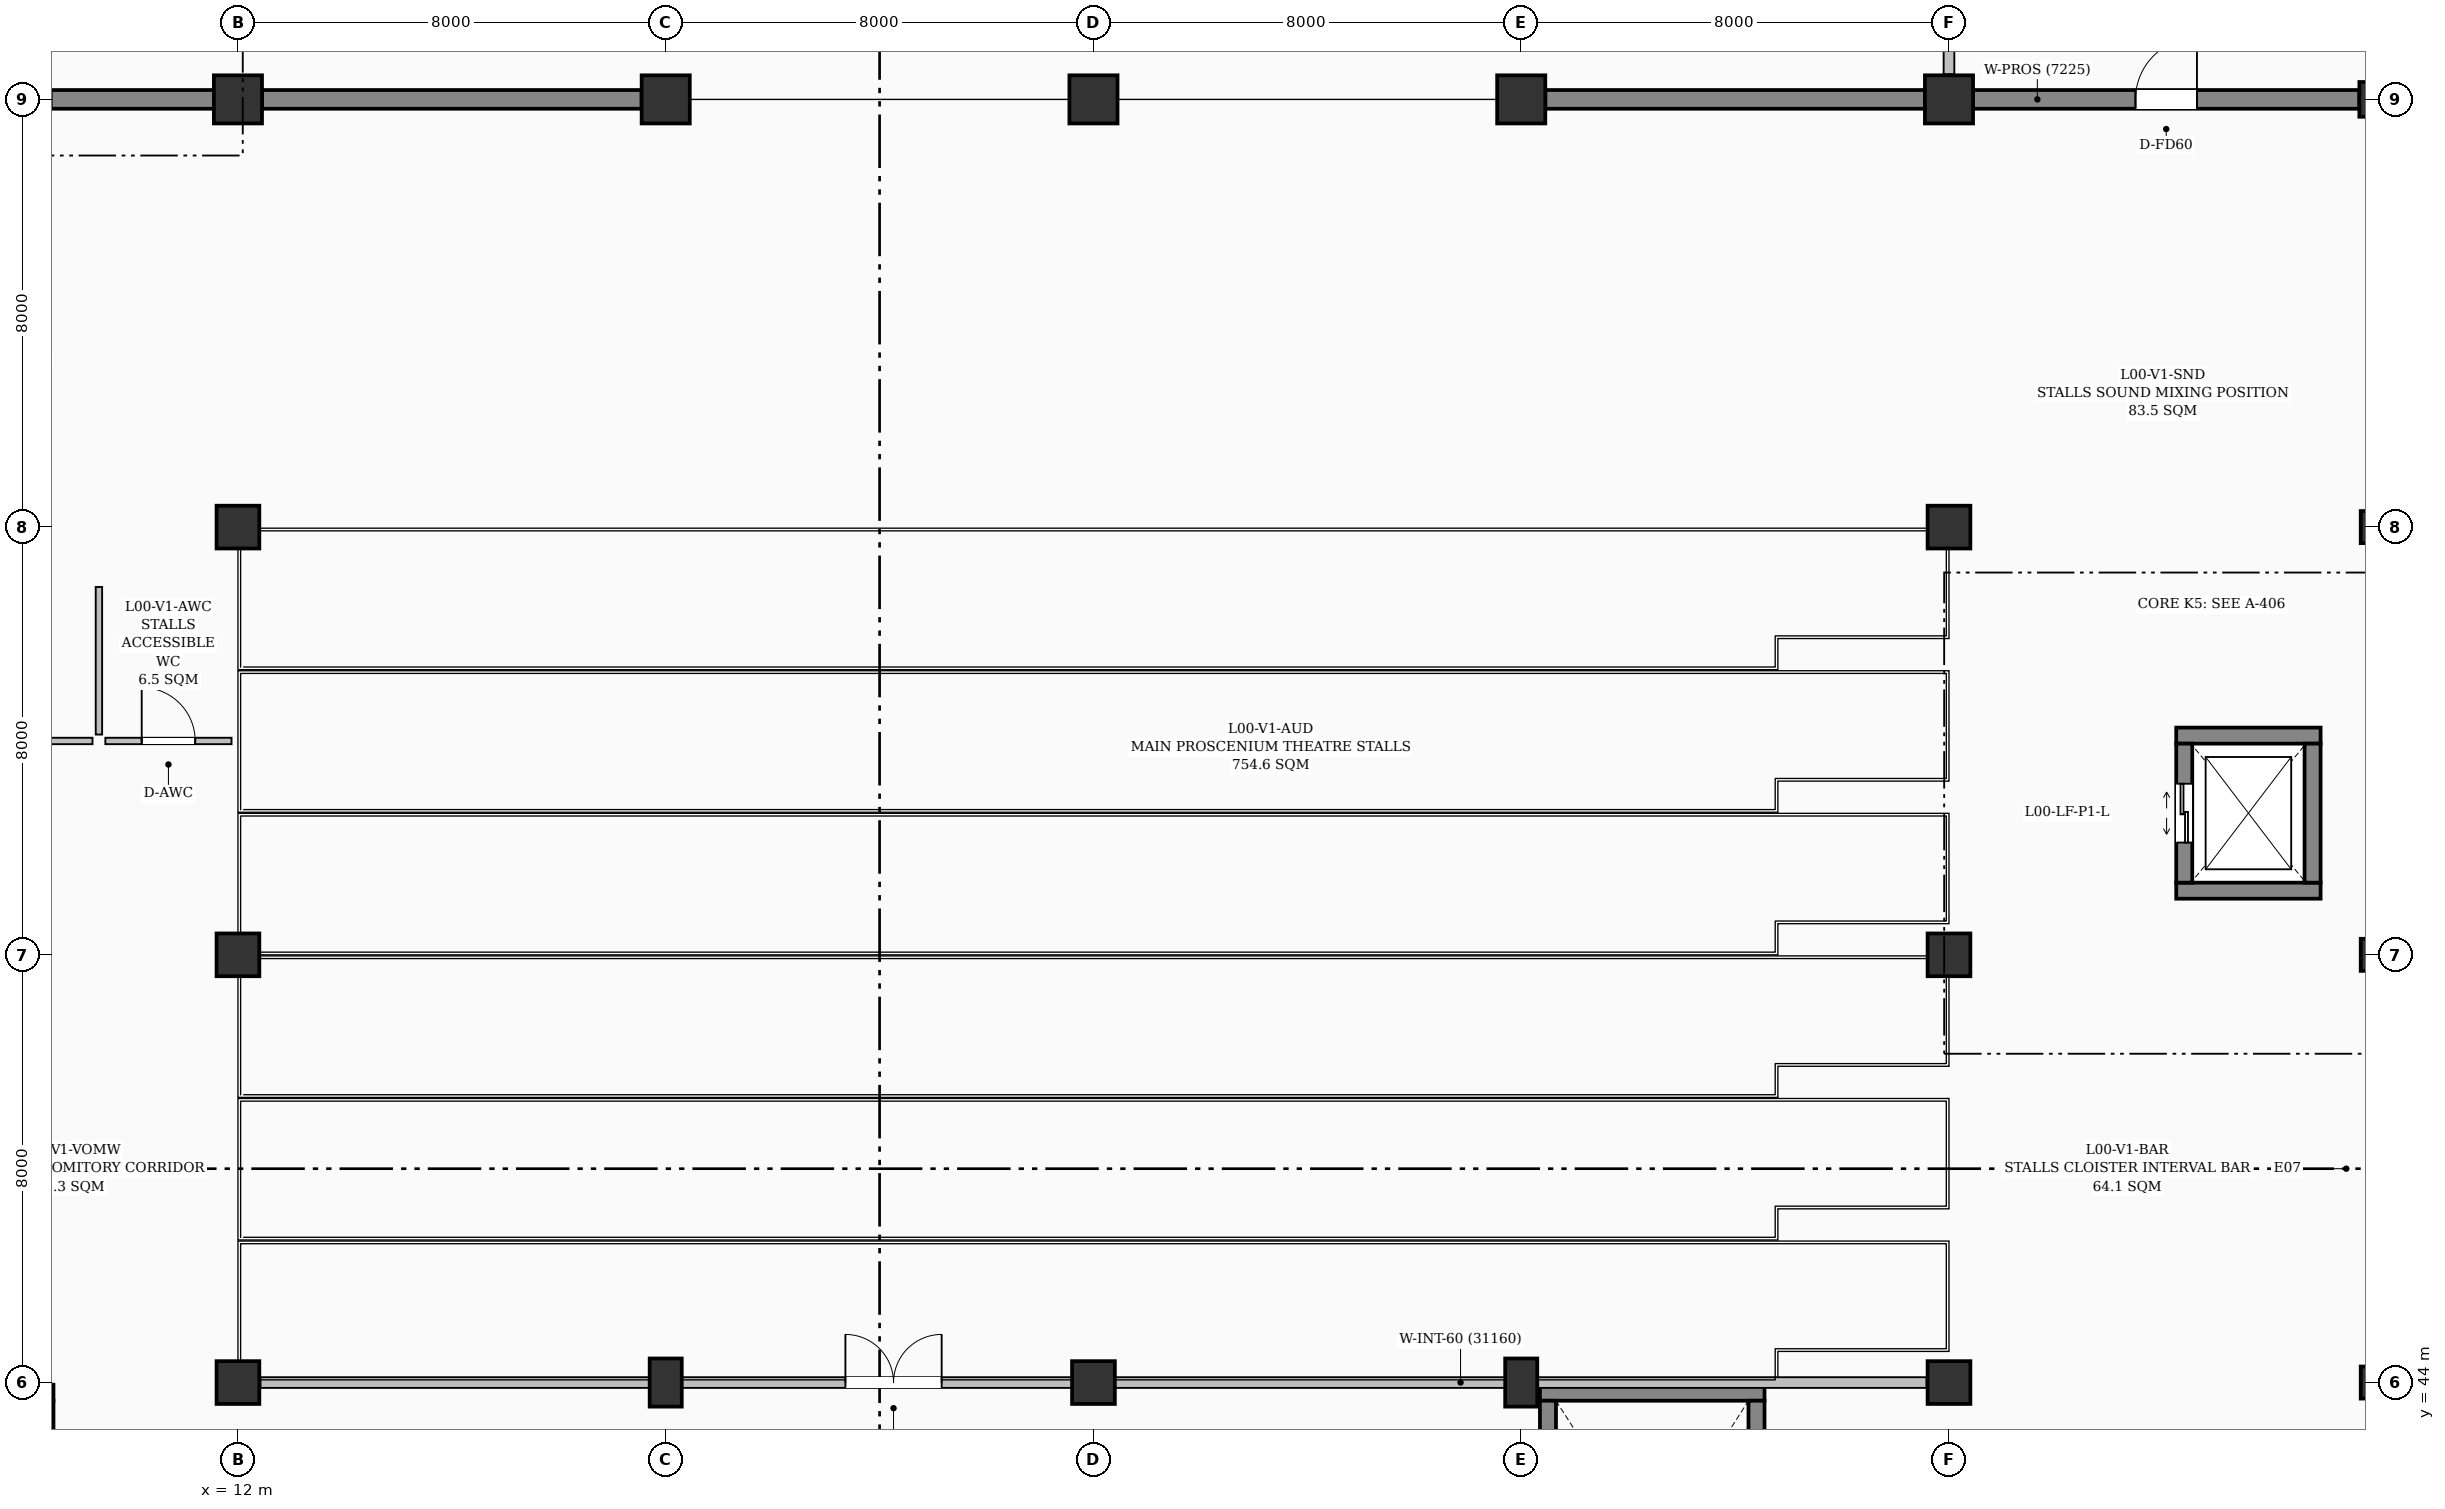
"""IFC4 building model, lengths in metres.
Left out: names, types, materials, properties, quantities, classifications, styles, units other than length and angle.
Written with IfcOpenShell. Run it as: python <this file> out.ifc"""

import sys

from ifc_helpers import new_model, si_unit, direction, frame, frame_2d, origin, origin_2d, place, context, subcontext, project, spatial, rectangle, extrude, element, fill, save


model = new_model("IFC4")
c1 = context("Model", 3, precision=1e-05, world=origin(), true_north=direction((0.0, 1.0)))
c2 = subcontext(c1, "Body", "Model", "MODEL_VIEW")
j1 = project(units=[si_unit("LENGTHUNIT", "METRE"), si_unit("PLANEANGLEUNIT", "RADIAN")], contexts=[c1])
p1 = place(None, origin())
s1 = spatial("IfcSite", under=j1, at=p1, CompositionType="ELEMENT")
p2 = place(p1, origin())
s2 = spatial("IfcBuilding", under=s1, at=p2, CompositionType="ELEMENT")
p3 = place(p2, origin())
s3 = spatial("IfcBuildingStorey", under=s2, at=p3, CompositionType="ELEMENT", Elevation=0.0)
for number, where, z_axis, x_axis in (
    (1, (12.0, 44.0, 0.0), (0.0, 0.0, 1.0), (1.0, 0.0, 0.0)),
    (2, (12.0, 52.0, 0.0), (0.0, 0.0, 1.0), (1.0, 0.0, 0.0)),
    (3, (12.0, 60.0, 0.0), (0.0, 0.0, 1.0), (1.0, 0.0, 0.0)),
):
    element("IfcColumn", number, at=place(p3, frame(where, z_axis=z_axis, x_axis=x_axis)), inside=s3, PredefinedType="COLUMN", context=c2, shape_type="SweptSolid", body=[
        extrude(rectangle(XDim=0.8, YDim=0.8, at=origin_2d()), origin(), (0.0, 0.0, 1.0), 4.8),
    ])
p4 = place(p3, frame((12.0, 68.0, 0.0), z_axis=(0.0, 0.0, 1.0), x_axis=(1.0, 0.0, 0.0)))
e4 = element("IfcColumn", 4, at=p4, inside=s3, PredefinedType="COLUMN", context=c2, shape_type="SweptSolid", body=[
    extrude(rectangle(XDim=0.9, YDim=0.9, at=origin_2d()), origin(), (0.0, 0.0, 1.0), 4.8),
])
p5 = place(p3, frame((20.0, 44.0, 0.0), z_axis=(0.0, 0.0, 1.0), x_axis=(1.0, 0.0, 0.0)))
e5 = element("IfcColumn", 5, at=p5, inside=s3, PredefinedType="COLUMN", context=c2, shape_type="SweptSolid", body=[
    extrude(rectangle(XDim=0.6, YDim=0.9, at=origin_2d()), origin(), (0.0, 0.0, 1.0), 4.8),
])
p6 = place(p3, frame((20.0, 68.0, 0.0), z_axis=(0.0, 0.0, 1.0), x_axis=(1.0, 0.0, 0.0)))
e6 = element("IfcColumn", 6, at=p6, inside=s3, PredefinedType="COLUMN", context=c2, shape_type="SweptSolid", body=[
    extrude(rectangle(XDim=0.9, YDim=0.9, at=origin_2d()), origin(), (0.0, 0.0, 1.0), 4.8),
])
p7 = place(p3, frame((28.0, 44.0, 0.0), z_axis=(0.0, 0.0, 1.0), x_axis=(1.0, 0.0, 0.0)))
e7 = element("IfcColumn", 7, at=p7, inside=s3, PredefinedType="COLUMN", context=c2, shape_type="SweptSolid", body=[
    extrude(rectangle(XDim=0.8, YDim=0.8, at=origin_2d()), origin(), (0.0, 0.0, 1.0), 4.8),
])
p8 = place(p3, frame((28.0, 68.0, 0.0), z_axis=(0.0, 0.0, 1.0), x_axis=(1.0, 0.0, 0.0)))
e8 = element("IfcColumn", 8, at=p8, inside=s3, PredefinedType="COLUMN", context=c2, shape_type="SweptSolid", body=[
    extrude(rectangle(XDim=0.9, YDim=0.9, at=origin_2d()), origin(), (0.0, 0.0, 1.0), 4.8),
])
p9 = place(p3, frame((36.0, 44.0, 0.0), z_axis=(0.0, 0.0, 1.0), x_axis=(1.0, 0.0, 0.0)))
e9 = element("IfcColumn", 9, at=p9, inside=s3, PredefinedType="COLUMN", context=c2, shape_type="SweptSolid", body=[
    extrude(rectangle(XDim=0.6, YDim=0.9, at=origin_2d()), origin(), (0.0, 0.0, 1.0), 4.8),
])
p10 = place(p3, frame((36.0, 68.0, 0.0), z_axis=(0.0, 0.0, 1.0), x_axis=(1.0, 0.0, 0.0)))
e10 = element("IfcColumn", 10, at=p10, inside=s3, PredefinedType="COLUMN", context=c2, shape_type="SweptSolid", body=[
    extrude(rectangle(XDim=0.9, YDim=0.9, at=origin_2d()), origin(), (0.0, 0.0, 1.0), 4.8),
])
for number, where, z_axis, x_axis in (
    (11, (44.0, 44.0, 0.0), (0.0, 0.0, 1.0), (1.0, 0.0, 0.0)),
    (12, (44.0, 52.0, 0.0), (0.0, 0.0, 1.0), (1.0, 0.0, 0.0)),
    (13, (44.0, 60.0, 0.0), (0.0, 0.0, 1.0), (1.0, 0.0, 0.0)),
):
    element("IfcColumn", number, at=place(p3, frame(where, z_axis=z_axis, x_axis=x_axis)), inside=s3, PredefinedType="COLUMN", context=c2, shape_type="SweptSolid", body=[
        extrude(rectangle(XDim=0.8, YDim=0.8, at=origin_2d()), origin(), (0.0, 0.0, 1.0), 4.8),
    ])
p11 = place(p3, frame((44.0, 68.0, 0.0), z_axis=(0.0, 0.0, 1.0), x_axis=(1.0, 0.0, 0.0)))
e14 = element("IfcColumn", 14, at=p11, inside=s3, PredefinedType="COLUMN", context=c2, shape_type="SweptSolid", body=[
    extrude(rectangle(XDim=0.9, YDim=0.9, at=origin_2d()), origin(), (0.0, 0.0, 1.0), 4.8),
])
for number, where, z_axis, x_axis in (
    (15, (52.0, 44.0, 0.0), (0.0, 0.0, 1.0), (1.0, 0.0, 0.0)),
    (16, (52.0, 52.0, 0.0), (0.0, 0.0, 1.0), (1.0, 0.0, 0.0)),
    (17, (52.0, 60.0, 0.0), (0.0, 0.0, 1.0), (1.0, 0.0, 0.0)),
):
    element("IfcColumn", number, at=place(p3, frame(where, z_axis=z_axis, x_axis=x_axis)), inside=s3, PredefinedType="COLUMN", context=c2, shape_type="SweptSolid", body=[
        extrude(rectangle(XDim=0.6, YDim=0.6, at=origin_2d()), origin(), (0.0, 0.0, 1.0), 4.8),
    ])
p12 = place(p3, frame((52.0, 68.0, 0.0), z_axis=(0.0, 0.0, 1.0), x_axis=(1.0, 0.0, 0.0)))
e18 = element("IfcColumn", 18, at=p12, inside=s3, PredefinedType="COLUMN", context=c2, shape_type="SweptSolid", body=[
    extrude(rectangle(XDim=0.65, YDim=0.65, at=origin_2d()), origin(), (0.0, 0.0, 1.0), 4.8),
])
p13 = place(p3, frame((4.325, 68.0, 0.0), z_axis=(0.0, 0.0, 1.0), x_axis=(1.0, 0.0, 0.0)))
e19 = element("IfcWall", 19, at=p13, inside=s3, PredefinedType="SHEAR", context=c2, shape_type="SweptSolid", body=[
    extrude(rectangle(XDim=7.225, YDim=0.35, at=frame_2d((3.613, 0.0))), origin(), (0.0, 0.0, 1.0), 4.55),
])
p14 = place(p13, frame((3.038, 0.0, 0.0)))
e20 = element("IfcOpeningElement", 20, at=p14, cuts=e19, PredefinedType="OPENING", context=c2, shape_type="SweptSolid", body=[
    extrude(rectangle(XDim=1.15, YDim=2.15, at=frame_2d((0.575, 1.075))), frame((0.0, 0.185, 0.0), z_axis=(0.0, -1.0, 0.0), x_axis=(1.0, 0.0, 0.0)), (0.0, 0.0, 1.0), 0.37),
])
for number, where, z_axis, x_axis in (
    (21, (12.45, 68.0, 0.0), (0.0, 0.0, 1.0), (1.0, 0.0, 0.0)),
    (22, (36.45, 68.0, 0.0), (0.0, 0.0, 1.0), (1.0, 0.0, 0.0)),
):
    element("IfcWall", number, at=place(p3, frame(where, z_axis=z_axis, x_axis=x_axis)), inside=s3, PredefinedType="SHEAR", context=c2, shape_type="SweptSolid", body=[
        extrude(rectangle(XDim=7.1, YDim=0.35, at=frame_2d((3.55, 0.0))), origin(), (0.0, 0.0, 1.0), 4.55),
    ])
p15 = place(p3, frame((44.45, 68.0, 0.0), z_axis=(0.0, 0.0, 1.0), x_axis=(1.0, 0.0, 0.0)))
e23 = element("IfcWall", 23, at=p15, inside=s3, PredefinedType="SHEAR", context=c2, shape_type="SweptSolid", body=[
    extrude(rectangle(XDim=7.225, YDim=0.35, at=frame_2d((3.613, 0.0))), origin(), (0.0, 0.0, 1.0), 4.55),
])
p16 = place(p15, frame((3.038, 0.0, 0.0)))
e24 = element("IfcOpeningElement", 24, at=p16, cuts=e23, PredefinedType="OPENING", context=c2, shape_type="SweptSolid", body=[
    extrude(rectangle(XDim=1.15, YDim=2.15, at=frame_2d((0.575, 1.075))), frame((0.0, 0.185, 0.0), z_axis=(0.0, -1.0, 0.0), x_axis=(1.0, 0.0, 0.0)), (0.0, 0.0, 1.0), 0.37),
])
p17 = place(p3, frame((8.55, 43.81, 0.0), z_axis=(0.0, 0.0, 1.0), x_axis=(-1.0, 0.0, 0.0)))
e25 = element("IfcWall", 25, at=p17, inside=s3, PredefinedType="SHEAR", context=c2, shape_type="SweptSolid", body=[
    extrude(rectangle(XDim=4.2, YDim=0.3, at=frame_2d((2.1, 0.0))), origin(), (0.0, 0.0, 1.0), 4.55),
])
p18 = place(p3, frame((8.4, 43.66, 0.0), z_axis=(0.0, 0.0, 1.0), x_axis=(0.0, -1.0, 0.0)))
e26 = element("IfcWall", 26, at=p18, inside=s3, PredefinedType="SHEAR", context=c2, shape_type="SweptSolid", body=[
    extrude(rectangle(XDim=7.32, YDim=0.3, at=frame_2d((3.66, 0.0))), origin(), (0.0, 0.0, 1.0), 4.55),
])
p19 = place(p18, frame((5.77, 0.0, 0.0)))
e27 = element("IfcOpeningElement", 27, at=p19, cuts=e26, PredefinedType="OPENING", context=c2, shape_type="SweptSolid", body=[
    extrude(rectangle(XDim=1.2, YDim=2.15, at=frame_2d((0.6, 1.075))), frame((0.0, 0.16, 0.0), z_axis=(0.0, -1.0, 0.0), x_axis=(1.0, 0.0, 0.0)), (0.0, 0.0, 1.0), 0.32),
])
p20 = place(p3, frame((40.55, 43.81, 0.0), z_axis=(0.0, 0.0, 1.0), x_axis=(-1.0, 0.0, 0.0)))
e28 = element("IfcWall", 28, at=p20, inside=s3, PredefinedType="SHEAR", context=c2, shape_type="SweptSolid", body=[
    extrude(rectangle(XDim=4.2, YDim=0.3, at=frame_2d((2.1, 0.0))), origin(), (0.0, 0.0, 1.0), 4.55),
])
p21 = place(p3, frame((36.5, 36.34, 0.0), z_axis=(0.0, 0.0, 1.0), x_axis=(0.0, 1.0, 0.0)))
e29 = element("IfcWall", 29, at=p21, inside=s3, PredefinedType="SHEAR", context=c2, shape_type="SweptSolid", body=[
    extrude(rectangle(XDim=7.32, YDim=0.3, at=frame_2d((3.66, 0.0))), origin(), (0.0, 0.0, 1.0), 4.55),
])
p22 = place(p3, frame((40.4, 43.66, 0.0), z_axis=(0.0, 0.0, 1.0), x_axis=(0.0, -1.0, 0.0)))
e30 = element("IfcWall", 30, at=p22, inside=s3, PredefinedType="SHEAR", context=c2, shape_type="SweptSolid", body=[
    extrude(rectangle(XDim=7.32, YDim=0.3, at=frame_2d((3.66, 0.0))), origin(), (0.0, 0.0, 1.0), 4.55),
])
p23 = place(p22, frame((5.77, 0.0, 0.0)))
e31 = element("IfcOpeningElement", 31, at=p23, cuts=e30, PredefinedType="OPENING", context=c2, shape_type="SweptSolid", body=[
    extrude(rectangle(XDim=1.2, YDim=2.15, at=frame_2d((0.6, 1.075))), frame((0.0, 0.16, 0.0), z_axis=(0.0, -1.0, 0.0), x_axis=(1.0, 0.0, 0.0)), (0.0, 0.0, 1.0), 0.32),
])
for number, where, z_axis, x_axis in (
    (32, (48.25, 53.2, 0.0), (0.0, 0.0, 1.0), (1.0, 0.0, 0.0)),
    (33, (50.95, 56.1, 0.0), (0.0, 0.0, 1.0), (-1.0, 0.0, 0.0)),
):
    element("IfcWall", number, at=place(p3, frame(where, z_axis=z_axis, x_axis=x_axis)), inside=s3, PredefinedType="SHEAR", context=c2, shape_type="SweptSolid", body=[
        extrude(rectangle(XDim=2.7, YDim=0.3, at=frame_2d((1.35, 0.0))), origin(), (0.0, 0.0, 1.0), 4.55),
    ])
p24 = place(p3, frame((48.4, 53.35, 0.0), z_axis=(0.0, 0.0, 1.0), x_axis=(0.0, 1.0, 0.0)))
e34 = element("IfcWall", 34, at=p24, inside=s3, PredefinedType="SHEAR", context=c2, shape_type="SweptSolid", body=[
    extrude(rectangle(XDim=2.6, YDim=0.3, at=frame_2d((1.3, 0.0))), origin(), (0.0, 0.0, 1.0), 4.55),
])
p25 = place(p24, frame((0.75, 0.0, 0.0)))
e35 = element("IfcOpeningElement", 35, at=p25, cuts=e34, PredefinedType="OPENING", context=c2, shape_type="SweptSolid", body=[
    extrude(rectangle(XDim=1.1, YDim=2.15, at=frame_2d((0.55, 1.075))), frame((0.0, 0.16, 0.0), z_axis=(0.0, -1.0, 0.0), x_axis=(1.0, 0.0, 0.0)), (0.0, 0.0, 1.0), 0.32),
])
p26 = place(p3, frame((50.8, 55.95, 0.0), z_axis=(0.0, 0.0, 1.0), x_axis=(0.0, -1.0, 0.0)))
e36 = element("IfcWall", 36, at=p26, inside=s3, PredefinedType="SHEAR", context=c2, shape_type="SweptSolid", body=[
    extrude(rectangle(XDim=2.6, YDim=0.3, at=frame_2d((1.3, 0.0))), origin(), (0.0, 0.0, 1.0), 4.55),
])
p27 = place(p3, frame((12.42, 44.0, 0.0), z_axis=(0.0, 0.0, 1.0), x_axis=(1.0, 0.0, 0.0)))
e37 = element("IfcWall", 37, at=p27, inside=s3, PredefinedType="PARTITIONING", context=c2, shape_type="SweptSolid", body=[
    extrude(rectangle(XDim=31.16, YDim=0.2, at=frame_2d((15.58, 0.0))), origin(), (0.0, 0.0, 1.0), 3.685),
])
p28 = place(p27, frame((10.941, 0.0, 0.0)))
e38 = element("IfcOpeningElement", 38, at=p28, cuts=e37, PredefinedType="OPENING", context=c2, shape_type="SweptSolid", body=[
    extrude(rectangle(XDim=1.8, YDim=2.35, at=frame_2d((0.9, 1.175))), frame((0.0, 0.11, 0.0), z_axis=(0.0, -1.0, 0.0), x_axis=(1.0, 0.0, 0.0)), (0.0, 0.0, 1.0), 0.22),
])
p29 = place(p3, frame((4.12, 56.0, 0.0), z_axis=(0.0, 0.0, 1.0), x_axis=(1.0, 0.0, 0.0)))
e39 = element("IfcWall", 39, at=p29, inside=s3, PredefinedType="PARTITIONING", context=c2, shape_type="SweptSolid", body=[
    extrude(rectangle(XDim=5.16, YDim=0.12, at=frame_2d((2.58, 0.0))), origin(), (0.0, 0.0, 1.0), 4.55),
])
p30 = place(p29, frame((2.105, 0.0, 0.0)))
e40 = element("IfcOpeningElement", 40, at=p30, cuts=e39, PredefinedType="OPENING", context=c2, shape_type="SweptSolid", body=[
    extrude(rectangle(XDim=0.95, YDim=2.1, at=frame_2d((0.475, 1.05))), frame((0.0, 0.07, 0.0), z_axis=(0.0, -1.0, 0.0), x_axis=(1.0, 0.0, 0.0)), (0.0, 0.0, 1.0), 0.14),
])
p31 = place(p3, frame((9.52, 56.0, 0.0), z_axis=(0.0, 0.0, 1.0), x_axis=(1.0, 0.0, 0.0)))
e41 = element("IfcWall", 41, at=p31, inside=s3, PredefinedType="PARTITIONING", context=c2, shape_type="SweptSolid", body=[
    extrude(rectangle(XDim=2.36, YDim=0.12, at=frame_2d((1.18, 0.0))), origin(), (0.0, 0.0, 1.0), 4.55),
])
p32 = place(p31, frame((0.68, 0.0, 0.0)))
e42 = element("IfcOpeningElement", 42, at=p32, cuts=e41, PredefinedType="OPENING", context=c2, shape_type="SweptSolid", body=[
    extrude(rectangle(XDim=1.0, YDim=2.1, at=frame_2d((0.5, 1.05))), frame((0.0, 0.07, 0.0), z_axis=(0.0, -1.0, 0.0), x_axis=(1.0, 0.0, 0.0)), (0.0, 0.0, 1.0), 0.14),
])
p33 = place(p3, frame((9.4, 56.12, 0.0), z_axis=(0.0, 0.0, 1.0), x_axis=(0.0, 1.0, 0.0)))
e43 = element("IfcWall", 43, at=p33, inside=s3, PredefinedType="PARTITIONING", context=c2, shape_type="SweptSolid", body=[
    extrude(rectangle(XDim=2.76, YDim=0.12, at=frame_2d((1.38, 0.0))), origin(), (0.0, 0.0, 1.0), 4.55),
])
p34 = place(p3, frame((44.0, 68.47, 0.0), z_axis=(0.0, 0.0, 1.0), x_axis=(0.0, 1.0, 0.0)))
e44 = element("IfcWall", 44, at=p34, inside=s3, PredefinedType="PARTITIONING", context=c2, shape_type="SweptSolid", body=[
    extrude(rectangle(XDim=9.41, YDim=0.2, at=frame_2d((4.705, 0.0))), origin(), (0.0, 0.0, 1.0), 3.635),
])
p35 = place(p34, frame((3.805, 0.0, 0.0)))
e45 = element("IfcOpeningElement", 45, at=p35, cuts=e44, PredefinedType="OPENING", context=c2, shape_type="SweptSolid", body=[
    extrude(rectangle(XDim=1.8, YDim=2.35, at=frame_2d((0.9, 1.175))), frame((0.0, 0.11, 0.0), z_axis=(0.0, -1.0, 0.0), x_axis=(1.0, 0.0, 0.0)), (0.0, 0.0, 1.0), 0.22),
])
p36 = place(p25, origin())
e46 = element("IfcDoor", 46, at=p36, inside=s3, OperationType="DOUBLE_DOOR_SLIDING", PredefinedType="DOOR", context=c2, shape_type="SweptSolid", body=[
    extrude(rectangle(XDim=1.1, YDim=2.15, at=frame_2d((0.55, 1.075))), frame((0.0, 0.025, 0.0), z_axis=(0.0, -1.0, 0.0), x_axis=(1.0, 0.0, 0.0)), (0.0, 0.0, 1.0), 0.05),
])
fill(e35, e46)
p37 = place(p28, origin())
e47 = element("IfcDoor", 47, at=p37, inside=s3, OperationType="DOUBLE_DOOR_SINGLE_SWING", PredefinedType="DOOR", context=c2, shape_type="SweptSolid", body=[
    extrude(rectangle(XDim=1.8, YDim=2.35, at=frame_2d((0.9, 1.175))), frame((0.0, 0.025, 0.0), z_axis=(0.0, -1.0, 0.0), x_axis=(1.0, 0.0, 0.0)), (0.0, 0.0, 1.0), 0.05),
])
fill(e38, e47)
p38 = place(p32, origin())
e48 = element("IfcDoor", 48, at=p38, inside=s3, OperationType="SINGLE_SWING_LEFT", PredefinedType="DOOR", context=c2, shape_type="SweptSolid", body=[
    extrude(rectangle(XDim=1.0, YDim=2.1, at=frame_2d((0.5, 1.05))), frame((0.0, 0.025, 0.0), z_axis=(0.0, -1.0, 0.0), x_axis=(1.0, 0.0, 0.0)), (0.0, 0.0, 1.0), 0.05),
])
fill(e42, e48)
p39 = place(p16, origin())
e49 = element("IfcDoor", 49, at=p39, inside=s3, OperationType="SINGLE_SWING_RIGHT", PredefinedType="DOOR", context=c2, shape_type="SweptSolid", body=[
    extrude(rectangle(XDim=1.15, YDim=2.15, at=frame_2d((0.575, 1.075))), frame((0.0, 0.025, 0.0), z_axis=(0.0, -1.0, 0.0), x_axis=(1.0, 0.0, 0.0)), (0.0, 0.0, 1.0), 0.05),
])
fill(e24, e49)
save(model, sys.argv[1])
